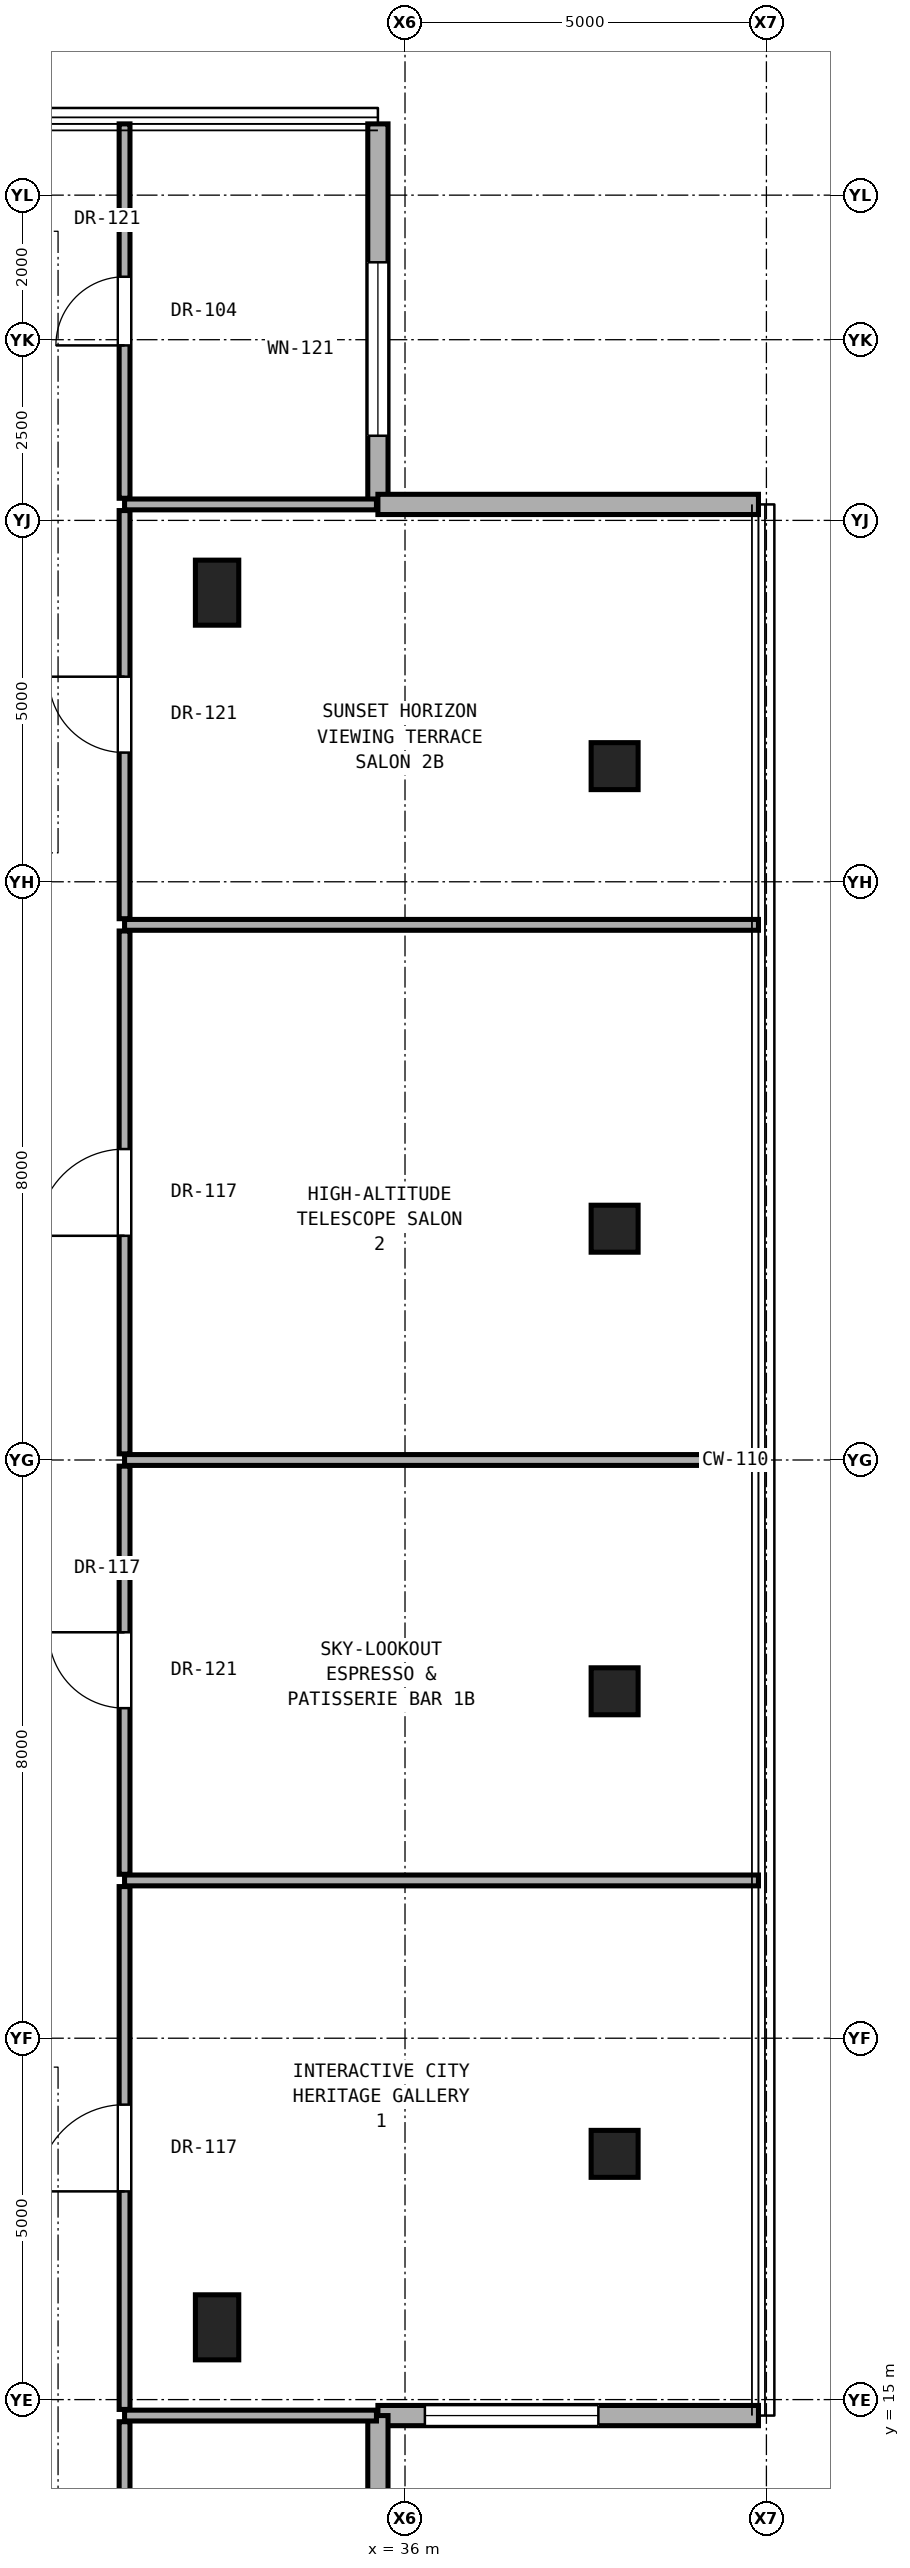
"""IFC4 building model, lengths in metres.
Left out: names, types, materials, properties, quantities, classifications, styles, units other than length and angle.
Written with IfcOpenShell. Run it as: python <this file> out.ifc"""

import sys

from ifc_helpers import new_model, si_unit, direction, frame, frame_2d, origin, origin_2d, place, context, subcontext, project, spatial, rectangle, hollow_rectangle, extrude, element, fill, save


model = new_model("IFC4")
c1 = context("Model", 3, precision=1e-05, world=origin(), true_north=direction((0.0, 1.0)))
c2 = subcontext(c1, "Body", "Model", "MODEL_VIEW")
j1 = project(units=[si_unit("LENGTHUNIT", "METRE"), si_unit("PLANEANGLEUNIT", "RADIAN")], contexts=[c1])
p1 = place(None, origin())
s1 = spatial("IfcSite", under=j1, at=p1, CompositionType="ELEMENT")
p2 = place(p1, origin())
s2 = spatial("IfcBuilding", under=s1, at=p2, CompositionType="ELEMENT")
p3 = place(p2, frame((0.0, 0.0, 256.3)))
s3 = spatial("IfcBuildingStorey", under=s2, at=p3, CompositionType="ELEMENT", Elevation=256.3)
for number, where, z_axis, x_axis in (
    (1, (38.9, 18.4, 0.0), (0.0, 0.0, 1.0), (1.0, 0.0, 0.0)),
    (2, (38.9, 24.8, 0.0), (0.0, 0.0, 1.0), (1.0, 0.0, 0.0)),
    (3, (38.9, 31.2, 0.0), (0.0, 0.0, 1.0), (1.0, 0.0, 0.0)),
    (4, (38.9, 37.6, 0.0), (0.0, 0.0, 1.0), (1.0, 0.0, 0.0)),
):
    element("IfcColumn", number, at=place(p3, frame(where, z_axis=z_axis, x_axis=x_axis)), inside=s3, PredefinedType="COLUMN", context=c2, shape_type="SweptSolid", body=[
        extrude(hollow_rectangle(XDim=0.65, YDim=0.65, WallThickness=0.036, at=origin_2d()), origin(), (0.0, 0.0, 1.0), 3.6),
    ])
for number, where, z_axis, x_axis in (
    (5, (33.4, 16.0, 0.0), (0.0, 0.0, 1.0), (1.0, 0.0, 0.0)),
    (6, (33.4, 40.0, 0.0), (0.0, 0.0, 1.0), (1.0, 0.0, 0.0)),
):
    element("IfcColumn", number, at=place(p3, frame(where, z_axis=z_axis, x_axis=x_axis)), inside=s3, PredefinedType="PILASTER", context=c2, shape_type="SweptSolid", body=[
        extrude(rectangle(XDim=0.6, YDim=0.9, at=origin_2d()), origin(), (0.0, 0.0, 1.0), 3.6),
    ])
p4 = place(p3, frame((35.625, 41.221, 0.0), z_axis=(0.0, 0.0, 1.0), x_axis=(0.0, 1.0, 0.0)))
e7 = element("IfcWall", 7, at=p4, inside=s3, PredefinedType="SOLIDWALL", context=c2, shape_type="SweptSolid", body=[
    extrude(rectangle(XDim=5.265, YDim=0.28, at=frame_2d((2.633, 0.0))), origin(), (0.0, 0.0, 1.0), 3.38),
])
p5 = place(p4, frame((0.95, 0.0, 0.85)))
e8 = element("IfcOpeningElement", 8, at=p5, cuts=e7, PredefinedType="OPENING", context=c2, shape_type="SweptSolid", body=[
    extrude(rectangle(XDim=2.4, YDim=2.35, at=frame_2d((1.2, 1.175))), frame((0.0, 0.15, 0.0), z_axis=(0.0, -1.0, 0.0), x_axis=(1.0, 0.0, 0.0)), (0.0, 0.0, 1.0), 0.3),
])
p6 = place(p3, frame((35.625, 14.779, 0.0), z_axis=(0.0, 0.0, 1.0), x_axis=(1.0, 0.0, 0.0)))
e9 = element("IfcWall", 9, at=p6, inside=s3, PredefinedType="SOLIDWALL", context=c2, shape_type="SweptSolid", body=[
    extrude(rectangle(XDim=5.265, YDim=0.28, at=frame_2d((2.632, 0.0))), origin(), (0.0, 0.0, 1.0), 3.38),
])
p7 = place(p6, frame((0.65, 0.0, 0.85)))
e10 = element("IfcOpeningElement", 10, at=p7, cuts=e9, PredefinedType="OPENING", context=c2, shape_type="SweptSolid", body=[
    extrude(rectangle(XDim=2.4, YDim=2.35, at=frame_2d((1.2, 1.175))), frame((0.0, 0.15, 0.0), z_axis=(0.0, -1.0, 0.0), x_axis=(1.0, 0.0, 0.0)), (0.0, 0.0, 1.0), 0.3),
])
p8 = place(p3, frame((35.625, 9.514, 0.0), z_axis=(0.0, 0.0, 1.0), x_axis=(0.0, 1.0, 0.0)))
e11 = element("IfcWall", 11, at=p8, inside=s3, PredefinedType="SOLIDWALL", context=c2, shape_type="SweptSolid", body=[
    extrude(rectangle(XDim=5.265, YDim=0.28, at=frame_2d((2.633, 0.0))), origin(), (0.0, 0.0, 1.0), 3.38),
])
p9 = place(p3, frame((40.89, 41.221, 0.0), z_axis=(0.0, 0.0, 1.0), x_axis=(-1.0, 0.0, 0.0)))
e12 = element("IfcWall", 12, at=p9, inside=s3, PredefinedType="SOLIDWALL", context=c2, shape_type="SweptSolid", body=[
    extrude(rectangle(XDim=5.265, YDim=0.28, at=frame_2d((2.632, 0.0))), origin(), (0.0, 0.0, 1.0), 3.38),
])
p10 = place(p3, frame((32.12, 14.779, 0.0), z_axis=(0.0, 0.0, 1.0), x_axis=(1.0, 0.0, 0.0)))
e13 = element("IfcWall", 13, at=p10, inside=s3, PredefinedType="PARTITIONING", context=c2, shape_type="SweptSolid", body=[
    extrude(rectangle(XDim=3.485, YDim=0.15, at=frame_2d((1.742, 0.0))), origin(), (0.0, 0.0, 1.0), 3.4),
])
for number, where, z_axis, x_axis in (
    (14, (32.12, 22.183, 0.0), (0.0, 0.0, 1.0), (1.0, 0.0, 0.0)),
    (15, (32.12, 28.0, 0.0), (0.0, 0.0, 1.0), (1.0, 0.0, 0.0)),
    (16, (32.12, 35.404, 0.0), (0.0, 0.0, 1.0), (1.0, 0.0, 0.0)),
):
    element("IfcWall", number, at=place(p3, frame(where, z_axis=z_axis, x_axis=x_axis)), inside=s3, PredefinedType="PARTITIONING", context=c2, shape_type="SweptSolid", body=[
        extrude(rectangle(XDim=8.77, YDim=0.15, at=frame_2d((4.385, 0.0))), origin(), (0.0, 0.0, 1.0), 2.619),
    ])
p11 = place(p3, frame((32.12, 41.221, 0.0), z_axis=(0.0, 0.0, 1.0), x_axis=(1.0, 0.0, 0.0)))
e17 = element("IfcWall", 17, at=p11, inside=s3, PredefinedType="PARTITIONING", context=c2, shape_type="SweptSolid", body=[
    extrude(rectangle(XDim=3.485, YDim=0.15, at=frame_2d((1.742, 0.0))), origin(), (0.0, 0.0, 1.0), 3.4),
])
p12 = place(p3, frame((32.12, 9.514, 0.0), z_axis=(0.0, 0.0, 1.0), x_axis=(0.0, 1.0, 0.0)))
e18 = element("IfcWall", 18, at=p12, inside=s3, PredefinedType="PARTITIONING", context=c2, shape_type="SweptSolid", body=[
    extrude(rectangle(XDim=5.18, YDim=0.15, at=frame_2d((2.59, 0.0))), origin(), (0.0, 0.0, 1.0), 3.4),
])
p13 = place(p12, frame((2.115, 0.0, 0.0)))
e19 = element("IfcOpeningElement", 19, at=p13, cuts=e18, PredefinedType="OPENING", context=c2, shape_type="SweptSolid", body=[
    extrude(rectangle(XDim=0.95, YDim=2.15, at=frame_2d((0.475, 1.075))), frame((0.0, 0.085, 0.0), z_axis=(0.0, -1.0, 0.0), x_axis=(1.0, 0.0, 0.0)), (0.0, 0.0, 1.0), 0.17),
])
p14 = place(p3, frame((32.12, 14.864, 0.0), z_axis=(0.0, 0.0, 1.0), x_axis=(0.0, 1.0, 0.0)))
e20 = element("IfcWall", 20, at=p14, inside=s3, PredefinedType="PARTITIONING", context=c2, shape_type="SweptSolid", body=[
    extrude(rectangle(XDim=7.234, YDim=0.15, at=frame_2d((3.617, 0.0))), origin(), (0.0, 0.0, 1.0), 2.792),
])
p15 = place(p14, frame((3.017, 0.0, 0.0)))
e21 = element("IfcOpeningElement", 21, at=p15, cuts=e20, PredefinedType="OPENING", context=c2, shape_type="SweptSolid", body=[
    extrude(rectangle(XDim=1.2, YDim=2.25, at=frame_2d((0.6, 1.125))), frame((0.0, 0.085, 0.0), z_axis=(0.0, -1.0, 0.0), x_axis=(1.0, 0.0, 0.0)), (0.0, 0.0, 1.0), 0.17),
])
p16 = place(p3, frame((32.12, 22.268, 0.0), z_axis=(0.0, 0.0, 1.0), x_axis=(0.0, 1.0, 0.0)))
e22 = element("IfcWall", 22, at=p16, inside=s3, PredefinedType="PARTITIONING", context=c2, shape_type="SweptSolid", body=[
    extrude(rectangle(XDim=5.647, YDim=0.15, at=frame_2d((2.823, 0.0))), origin(), (0.0, 0.0, 1.0), 2.696),
])
p17 = place(p16, frame((2.299, 0.0, 0.0)))
e23 = element("IfcOpeningElement", 23, at=p17, cuts=e22, PredefinedType="OPENING", context=c2, shape_type="SweptSolid", body=[
    extrude(rectangle(XDim=1.05, YDim=2.2, at=frame_2d((0.525, 1.1))), frame((0.0, 0.085, 0.0), z_axis=(0.0, -1.0, 0.0), x_axis=(1.0, 0.0, 0.0)), (0.0, 0.0, 1.0), 0.17),
])
p18 = place(p3, frame((32.12, 28.085, 0.0), z_axis=(0.0, 0.0, 1.0), x_axis=(0.0, 1.0, 0.0)))
e24 = element("IfcWall", 24, at=p18, inside=s3, PredefinedType="PARTITIONING", context=c2, shape_type="SweptSolid", body=[
    extrude(rectangle(XDim=7.234, YDim=0.15, at=frame_2d((3.617, 0.0))), origin(), (0.0, 0.0, 1.0), 2.696),
])
p19 = place(p18, frame((3.017, 0.0, 0.0)))
e25 = element("IfcOpeningElement", 25, at=p19, cuts=e24, PredefinedType="OPENING", context=c2, shape_type="SweptSolid", body=[
    extrude(rectangle(XDim=1.2, YDim=2.25, at=frame_2d((0.6, 1.125))), frame((0.0, 0.085, 0.0), z_axis=(0.0, -1.0, 0.0), x_axis=(1.0, 0.0, 0.0)), (0.0, 0.0, 1.0), 0.17),
])
p20 = place(p3, frame((32.12, 35.489, 0.0), z_axis=(0.0, 0.0, 1.0), x_axis=(0.0, 1.0, 0.0)))
e26 = element("IfcWall", 26, at=p20, inside=s3, PredefinedType="PARTITIONING", context=c2, shape_type="SweptSolid", body=[
    extrude(rectangle(XDim=5.647, YDim=0.15, at=frame_2d((2.823, 0.0))), origin(), (0.0, 0.0, 1.0), 2.792),
])
p21 = place(p20, frame((2.299, 0.0, 0.0)))
e27 = element("IfcOpeningElement", 27, at=p21, cuts=e26, PredefinedType="OPENING", context=c2, shape_type="SweptSolid", body=[
    extrude(rectangle(XDim=1.05, YDim=2.2, at=frame_2d((0.525, 1.1))), frame((0.0, 0.085, 0.0), z_axis=(0.0, -1.0, 0.0), x_axis=(1.0, 0.0, 0.0)), (0.0, 0.0, 1.0), 0.17),
])
p22 = place(p3, frame((32.12, 41.306, 0.0), z_axis=(0.0, 0.0, 1.0), x_axis=(0.0, 1.0, 0.0)))
e28 = element("IfcWall", 28, at=p22, inside=s3, PredefinedType="PARTITIONING", context=c2, shape_type="SweptSolid", body=[
    extrude(rectangle(XDim=5.18, YDim=0.15, at=frame_2d((2.59, 0.0))), origin(), (0.0, 0.0, 1.0), 3.4),
])
p23 = place(p22, frame((2.115, 0.0, 0.0)))
e29 = element("IfcOpeningElement", 29, at=p23, cuts=e28, PredefinedType="OPENING", context=c2, shape_type="SweptSolid", body=[
    extrude(rectangle(XDim=0.95, YDim=2.15, at=frame_2d((0.475, 1.075))), frame((0.0, 0.085, 0.0), z_axis=(0.0, -1.0, 0.0), x_axis=(1.0, 0.0, 0.0)), (0.0, 0.0, 1.0), 0.17),
])
p24 = place(p5, origin())
e30 = element("IfcWindow", 30, at=p24, inside=s3, PartitioningType="SINGLE_PANEL", PredefinedType="WINDOW", context=c2, shape_type="SweptSolid", body=[
    extrude(rectangle(XDim=2.4, YDim=2.35, at=frame_2d((1.2, 1.175))), frame((0.0, 0.03, 0.0), z_axis=(0.0, -1.0, 0.0), x_axis=(1.0, 0.0, 0.0)), (0.0, 0.0, 1.0), 0.06),
])
fill(e8, e30)
p25 = place(p7, origin())
e31 = element("IfcWindow", 31, at=p25, inside=s3, PartitioningType="SINGLE_PANEL", PredefinedType="WINDOW", context=c2, shape_type="SweptSolid", body=[
    extrude(rectangle(XDim=2.4, YDim=2.35, at=frame_2d((1.2, 1.175))), frame((0.0, 0.03, 0.0), z_axis=(0.0, -1.0, 0.0), x_axis=(1.0, 0.0, 0.0)), (0.0, 0.0, 1.0), 0.06),
])
fill(e10, e31)
p26 = place(p15, origin())
e32 = element("IfcDoor", 32, at=p26, inside=s3, OperationType="SINGLE_SWING_LEFT", PredefinedType="DOOR", context=c2, shape_type="SweptSolid", body=[
    extrude(rectangle(XDim=1.2, YDim=2.25, at=frame_2d((0.6, 1.125))), frame((0.0, 0.025, 0.0), z_axis=(0.0, -1.0, 0.0), x_axis=(1.0, 0.0, 0.0)), (0.0, 0.0, 1.0), 0.05),
])
fill(e21, e32)
p27 = place(p17, origin())
e33 = element("IfcDoor", 33, at=p27, inside=s3, OperationType="SINGLE_SWING_RIGHT", PredefinedType="DOOR", context=c2, shape_type="SweptSolid", body=[
    extrude(rectangle(XDim=1.05, YDim=2.2, at=frame_2d((0.525, 1.1))), frame((0.0, 0.025, 0.0), z_axis=(0.0, -1.0, 0.0), x_axis=(1.0, 0.0, 0.0)), (0.0, 0.0, 1.0), 0.05),
])
fill(e23, e33)
p28 = place(p19, origin())
e34 = element("IfcDoor", 34, at=p28, inside=s3, OperationType="SINGLE_SWING_LEFT", PredefinedType="DOOR", context=c2, shape_type="SweptSolid", body=[
    extrude(rectangle(XDim=1.2, YDim=2.25, at=frame_2d((0.6, 1.125))), frame((0.0, 0.025, 0.0), z_axis=(0.0, -1.0, 0.0), x_axis=(1.0, 0.0, 0.0)), (0.0, 0.0, 1.0), 0.05),
])
fill(e25, e34)
p29 = place(p21, origin())
e35 = element("IfcDoor", 35, at=p29, inside=s3, OperationType="SINGLE_SWING_RIGHT", PredefinedType="DOOR", context=c2, shape_type="SweptSolid", body=[
    extrude(rectangle(XDim=1.05, YDim=2.2, at=frame_2d((0.525, 1.1))), frame((0.0, 0.025, 0.0), z_axis=(0.0, -1.0, 0.0), x_axis=(1.0, 0.0, 0.0)), (0.0, 0.0, 1.0), 0.05),
])
fill(e27, e35)
p30 = place(p23, origin())
e36 = element("IfcDoor", 36, at=p30, inside=s3, OperationType="SINGLE_SWING_LEFT", PredefinedType="DOOR", context=c2, shape_type="SweptSolid", body=[
    extrude(rectangle(XDim=0.95, YDim=2.15, at=frame_2d((0.475, 1.075))), frame((0.0, 0.025, 0.0), z_axis=(0.0, -1.0, 0.0), x_axis=(1.0, 0.0, 0.0)), (0.0, 0.0, 1.0), 0.05),
])
fill(e29, e36)
save(model, sys.argv[1])
